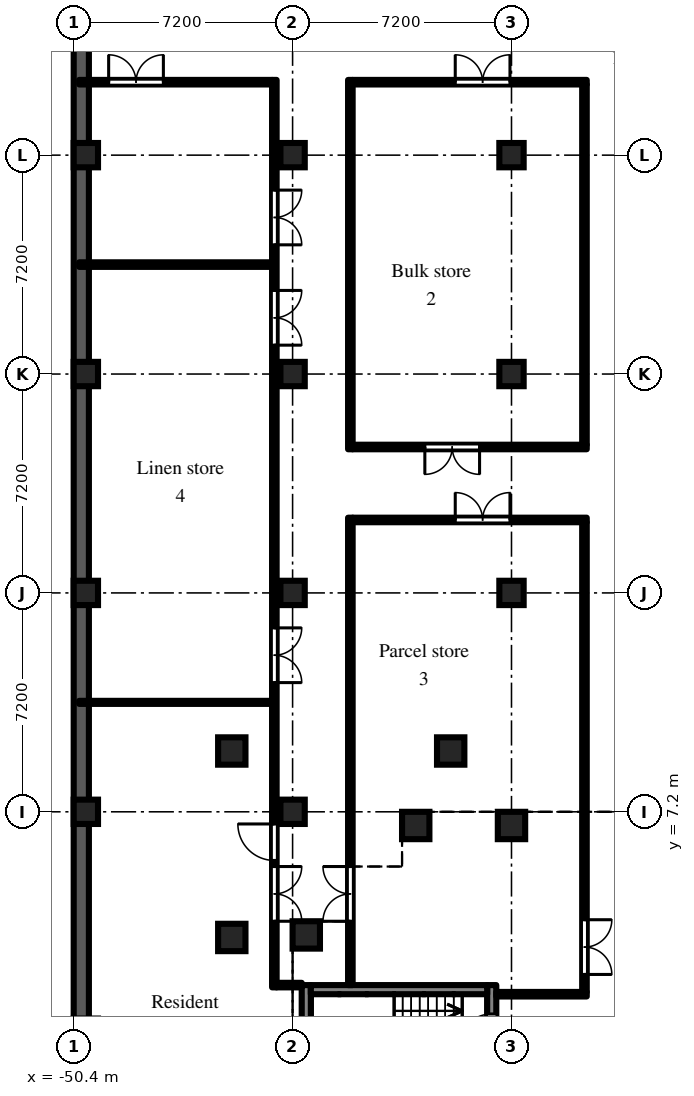
"""IFC4 building model, lengths in metres.
Left out: names, types, materials, properties, quantities, classifications, styles, units other than length and angle.
Written with IfcOpenShell. Run it as: python <this file> out.ifc"""

import sys

from ifc_helpers import new_model, si_unit, direction, frame, frame_2d, origin, origin_2d, place, context, subcontext, project, spatial, rectangle, extrude, element, fill, save


model = new_model("IFC4")
c1 = context("Model", 3, precision=1e-05, world=origin(), true_north=direction((0.0, 1.0)))
c2 = subcontext(c1, "Body", "Model", "MODEL_VIEW")
j1 = project(units=[si_unit("LENGTHUNIT", "METRE"), si_unit("PLANEANGLEUNIT", "RADIAN")], contexts=[c1])
p1 = place(None, origin())
s1 = spatial("IfcSite", under=j1, at=p1, CompositionType="ELEMENT")
p2 = place(p1, origin())
s2 = spatial("IfcBuilding", under=s1, at=p2, CompositionType="ELEMENT")
p3 = place(p2, frame((0.0, 0.0, -4.8)))
s3 = spatial("IfcBuildingStorey", under=s2, at=p3, CompositionType="ELEMENT", Elevation=-4.8)
p4 = place(p3, frame((-50.15, -49.9, -0.5), z_axis=(0.0, 0.0, 1.0), x_axis=(0.0, 1.0, 0.0)))
e1 = element("IfcWall", 1, at=p4, inside=s3, PredefinedType="SOLIDWALL", context=c2, shape_type="SweptSolid", body=[
    extrude(rectangle(XDim=99.8, YDim=0.5, at=frame_2d((49.9, 0.0))), origin(), (0.0, 0.0, 1.0), 5.3),
])
for number, where, z_axis, x_axis in (
    (2, (-42.75, 3.15, -0.5), (0.0, 0.0, 1.0), (1.0, 0.0, 0.0)),
    (3, (-39.15, 6.75, -0.5), (0.0, 0.0, 1.0), (1.0, 0.0, 0.0)),
    (4, (-36.0, 6.75, -0.5), (0.0, 0.0, 1.0), (1.0, 0.0, 0.0)),
):
    element("IfcColumn", number, at=place(p3, frame(where, z_axis=z_axis, x_axis=x_axis)), inside=s3, PredefinedType="COLUMN", context=c2, shape_type="SweptSolid", body=[
        extrude(rectangle(XDim=0.9, YDim=0.9, at=origin_2d()), origin(), (0.0, 0.0, 1.0), 5.3),
    ])
for number, where, z_axis, x_axis in (
    (5, (-50.0, 7.2, -0.5), (0.0, 0.0, 1.0), (1.0, 0.0, 0.0)),
    (6, (-50.0, 14.4, -0.5), (0.0, 0.0, 1.0), (1.0, 0.0, 0.0)),
    (7, (-50.0, 21.6, -0.5), (0.0, 0.0, 1.0), (1.0, 0.0, 0.0)),
    (8, (-50.0, 28.8, -0.5), (0.0, 0.0, 1.0), (1.0, 0.0, 0.0)),
    (9, (-43.2, 7.2, -0.5), (0.0, 0.0, 1.0), (1.0, 0.0, 0.0)),
    (10, (-43.2, 14.4, -0.5), (0.0, 0.0, 1.0), (1.0, 0.0, 0.0)),
    (11, (-43.2, 21.6, -0.5), (0.0, 0.0, 1.0), (1.0, 0.0, 0.0)),
    (12, (-43.2, 28.8, -0.5), (0.0, 0.0, 1.0), (1.0, 0.0, 0.0)),
    (13, (-36.0, 14.4, -0.5), (0.0, 0.0, 1.0), (1.0, 0.0, 0.0)),
    (14, (-36.0, 21.6, -0.5), (0.0, 0.0, 1.0), (1.0, 0.0, 0.0)),
    (15, (-36.0, 28.8, -0.5), (0.0, 0.0, 1.0), (1.0, 0.0, 0.0)),
):
    element("IfcColumn", number, at=place(p3, frame(where, z_axis=z_axis, x_axis=x_axis)), inside=s3, PredefinedType="COLUMN", context=c2, shape_type="SweptSolid", body=[
        extrude(rectangle(XDim=0.8, YDim=0.8, at=origin_2d()), origin(), (0.0, 0.0, 1.0), 5.3),
    ])
for number, where, z_axis, x_axis in (
    (16, (-45.2, 3.067, -0.5), (0.0, 0.0, 1.0), (1.0, 0.0, 0.0)),
    (17, (-45.2, 9.2, -0.5), (0.0, 0.0, 1.0), (1.0, 0.0, 0.0)),
    (18, (-38.0, 9.2, -0.5), (0.0, 0.0, 1.0), (1.0, 0.0, 0.0)),
):
    element("IfcColumn", number, at=place(p3, frame(where, z_axis=z_axis, x_axis=x_axis)), inside=s3, PredefinedType="COLUMN", context=c2, shape_type="SweptSolid", body=[
        extrude(rectangle(XDim=0.9, YDim=0.9, at=origin_2d()), origin(), (0.0, 0.0, 1.0), 5.3),
    ])
p5 = place(p3, frame((-36.65, -1.5, 0.0), z_axis=(0.0, 0.0, 1.0), x_axis=(0.0, 1.0, 0.0)))
e19 = element("IfcWall", 19, at=p5, inside=s3, PredefinedType="SHEAR", context=c2, shape_type="SweptSolid", body=[
    extrude(rectangle(XDim=3.0, YDim=0.3, at=frame_2d((1.5, 0.0))), origin(), (0.0, 0.0, 1.0), 4.35),
])
p6 = place(p5, frame((0.95, 0.0, 0.0)))
e20 = element("IfcOpeningElement", 20, at=p6, cuts=e19, PredefinedType="OPENING", context=c2, shape_type="SweptSolid", body=[
    extrude(rectangle(XDim=1.1, YDim=2.1, at=frame_2d((0.55, 1.05))), frame((0.0, 0.16, 0.0), z_axis=(0.0, -1.0, 0.0), x_axis=(1.0, 0.0, 0.0)), (0.0, 0.0, 1.0), 0.32),
])
p7 = place(p3, frame((-42.75, -1.5, 0.0), z_axis=(0.0, 0.0, 1.0), x_axis=(0.0, 1.0, 0.0)))
e21 = element("IfcWall", 21, at=p7, inside=s3, PredefinedType="SHEAR", context=c2, shape_type="SweptSolid", body=[
    extrude(rectangle(XDim=3.0, YDim=0.3, at=frame_2d((1.5, 0.0))), origin(), (0.0, 0.0, 1.0), 4.35),
])
p8 = place(p3, frame((-36.8, 1.35, 0.0), z_axis=(0.0, 0.0, 1.0), x_axis=(-1.0, 0.0, 0.0)))
e22 = element("IfcWall", 22, at=p8, inside=s3, PredefinedType="SHEAR", context=c2, shape_type="SweptSolid", body=[
    extrude(rectangle(XDim=5.8, YDim=0.3, at=frame_2d((2.9, 0.0))), origin(), (0.0, 0.0, 1.0), 4.35),
])
p9 = place(p3, frame((-50.22, 10.8, 0.0), z_axis=(0.0, 0.0, 1.0), x_axis=(1.0, 0.0, 0.0)))
e23 = element("IfcWall", 23, at=p9, inside=s3, PredefinedType="PARTITIONING", context=c2, shape_type="SweptSolid", body=[
    extrude(rectangle(XDim=6.345, YDim=0.1, at=frame_2d((3.172, 0.0))), origin(), (0.0, 0.0, 1.0), 4.35),
])
p10 = place(p3, frame((-50.22, 25.2, 0.0), z_axis=(0.0, 0.0, 1.0), x_axis=(1.0, 0.0, 0.0)))
e24 = element("IfcWall", 24, at=p10, inside=s3, PredefinedType="PARTITIONING", context=c2, shape_type="SweptSolid", body=[
    extrude(rectangle(XDim=6.345, YDim=0.15, at=frame_2d((3.172, 0.0))), origin(), (0.0, 0.0, 1.0), 4.35),
])
p11 = place(p3, frame((-50.22, 31.2, 0.0), z_axis=(0.0, 0.0, 1.0), x_axis=(1.0, 0.0, 0.0)))
e25 = element("IfcWall", 25, at=p11, inside=s3, PredefinedType="PARTITIONING", context=c2, shape_type="SweptSolid", body=[
    extrude(rectangle(XDim=6.345, YDim=0.15, at=frame_2d((3.172, 0.0))), origin(), (0.0, 0.0, 1.0), 4.35),
])
p12 = place(p11, frame((0.97, 0.0, 0.0)))
e26 = element("IfcOpeningElement", 26, at=p12, cuts=e25, PredefinedType="OPENING", context=c2, shape_type="SweptSolid", body=[
    extrude(rectangle(XDim=1.8, YDim=2.1, at=frame_2d((0.9, 1.05))), frame((0.0, 0.085, 0.0), z_axis=(0.0, -1.0, 0.0), x_axis=(1.0, 0.0, 0.0)), (0.0, 0.0, 1.0), 0.17),
])
p13 = place(p3, frame((-43.8, 1.425, 0.0), z_axis=(0.0, 0.0, 1.0), x_axis=(0.0, 1.0, 0.0)))
e27 = element("IfcWall", 27, at=p13, inside=s3, PredefinedType="PARTITIONING", context=c2, shape_type="SweptSolid", body=[
    extrude(rectangle(XDim=29.85, YDim=0.15, at=frame_2d((14.925, 0.0))), origin(), (0.0, 0.0, 1.0), 4.35),
])
p14 = place(p13, frame((24.425, 0.0, 0.0)))
e28 = element("IfcOpeningElement", 28, at=p14, cuts=e27, PredefinedType="OPENING", context=c2, shape_type="SweptSolid", body=[
    extrude(rectangle(XDim=1.8, YDim=2.1, at=frame_2d((0.9, 1.05))), frame((0.0, 0.085, 0.0), z_axis=(0.0, -1.0, 0.0), x_axis=(1.0, 0.0, 0.0)), (0.0, 0.0, 1.0), 0.17),
])
p15 = place(p13, frame((10.025, 0.0, 0.0)))
e29 = element("IfcOpeningElement", 29, at=p15, cuts=e27, PredefinedType="OPENING", context=c2, shape_type="SweptSolid", body=[
    extrude(rectangle(XDim=1.8, YDim=2.1, at=frame_2d((0.9, 1.05))), frame((0.0, 0.085, 0.0), z_axis=(0.0, -1.0, 0.0), x_axis=(1.0, 0.0, 0.0)), (0.0, 0.0, 1.0), 0.17),
])
p16 = place(p13, frame((21.125, 0.0, 0.0)))
e30 = element("IfcOpeningElement", 30, at=p16, cuts=e27, PredefinedType="OPENING", context=c2, shape_type="SweptSolid", body=[
    extrude(rectangle(XDim=1.8, YDim=2.1, at=frame_2d((0.9, 1.05))), frame((0.0, 0.085, 0.0), z_axis=(0.0, -1.0, 0.0), x_axis=(1.0, 0.0, 0.0)), (0.0, 0.0, 1.0), 0.17),
])
p17 = place(p13, frame((2.175, 0.0, 0.0)))
e31 = element("IfcOpeningElement", 31, at=p17, cuts=e27, PredefinedType="OPENING", context=c2, shape_type="SweptSolid", body=[
    extrude(rectangle(XDim=1.8, YDim=2.1, at=frame_2d((0.9, 1.05))), frame((0.0, 0.085, 0.0), z_axis=(0.0, -1.0, 0.0), x_axis=(1.0, 0.0, 0.0)), (0.0, 0.0, 1.0), 0.17),
])
p18 = place(p13, frame((4.175, 0.0, 0.0)))
e32 = element("IfcOpeningElement", 32, at=p18, cuts=e27, PredefinedType="OPENING", context=c2, shape_type="SweptSolid", body=[
    extrude(rectangle(XDim=1.2, YDim=2.1, at=frame_2d((0.6, 1.05))), frame((0.0, 0.085, 0.0), z_axis=(0.0, -1.0, 0.0), x_axis=(1.0, 0.0, 0.0)), (0.0, 0.0, 1.0), 0.17),
])
p19 = place(p3, frame((-43.725, 1.5, 0.0), z_axis=(0.0, 0.0, 1.0), x_axis=(1.0, 0.0, 0.0)))
e33 = element("IfcWall", 33, at=p19, inside=s3, PredefinedType="PARTITIONING", context=c2, shape_type="SweptSolid", body=[
    extrude(rectangle(XDim=0.825, YDim=0.15, at=frame_2d((0.413, 0.0))), origin(), (0.0, 0.0, 1.0), 4.35),
])
p20 = place(p3, frame((-41.3, 1.5, 0.0), z_axis=(0.0, 0.0, 1.0), x_axis=(0.0, 1.0, 0.0)))
e34 = element("IfcWall", 34, at=p20, inside=s3, PredefinedType="PARTITIONING", context=c2, shape_type="SweptSolid", body=[
    extrude(rectangle(XDim=15.375, YDim=0.15, at=frame_2d((7.688, 0.0))), origin(), (0.0, 0.0, 1.0), 4.35),
])
p21 = place(p20, frame((2.1, 0.0, 0.0)))
e35 = element("IfcOpeningElement", 35, at=p21, cuts=e34, PredefinedType="OPENING", context=c2, shape_type="SweptSolid", body=[
    extrude(rectangle(XDim=1.8, YDim=2.1, at=frame_2d((0.9, 1.05))), frame((0.0, 0.085, 0.0), z_axis=(0.0, -1.0, 0.0), x_axis=(1.0, 0.0, 0.0)), (0.0, 0.0, 1.0), 0.17),
])
p22 = place(p3, frame((-41.225, 16.8, 0.0), z_axis=(0.0, 0.0, 1.0), x_axis=(1.0, 0.0, 0.0)))
e36 = element("IfcWall", 36, at=p22, inside=s3, PredefinedType="PARTITIONING", context=c2, shape_type="SweptSolid", body=[
    extrude(rectangle(XDim=7.7, YDim=0.15, at=frame_2d((3.85, 0.0))), origin(), (0.0, 0.0, 1.0), 4.35),
])
p23 = place(p22, frame((3.375, 0.0, 0.0)))
e37 = element("IfcOpeningElement", 37, at=p23, cuts=e36, PredefinedType="OPENING", context=c2, shape_type="SweptSolid", body=[
    extrude(rectangle(XDim=1.8, YDim=2.1, at=frame_2d((0.9, 1.05))), frame((0.0, 0.085, 0.0), z_axis=(0.0, -1.0, 0.0), x_axis=(1.0, 0.0, 0.0)), (0.0, 0.0, 1.0), 0.17),
])
p24 = place(p3, frame((-41.3, 19.125, 0.0), z_axis=(0.0, 0.0, 1.0), x_axis=(0.0, 1.0, 0.0)))
e38 = element("IfcWall", 38, at=p24, inside=s3, PredefinedType="PARTITIONING", context=c2, shape_type="SweptSolid", body=[
    extrude(rectangle(XDim=12.15, YDim=0.15, at=frame_2d((6.075, 0.0))), origin(), (0.0, 0.0, 1.0), 4.35),
])
p25 = place(p3, frame((-41.225, 19.2, 0.0), z_axis=(0.0, 0.0, 1.0), x_axis=(1.0, 0.0, 0.0)))
e39 = element("IfcWall", 39, at=p25, inside=s3, PredefinedType="PARTITIONING", context=c2, shape_type="SweptSolid", body=[
    extrude(rectangle(XDim=7.7, YDim=0.15, at=frame_2d((3.85, 0.0))), origin(), (0.0, 0.0, 1.0), 4.35),
])
p26 = place(p25, frame((2.375, 0.0, 0.0)))
e40 = element("IfcOpeningElement", 40, at=p26, cuts=e39, PredefinedType="OPENING", context=c2, shape_type="SweptSolid", body=[
    extrude(rectangle(XDim=1.8, YDim=2.1, at=frame_2d((0.9, 1.05))), frame((0.0, 0.085, 0.0), z_axis=(0.0, -1.0, 0.0), x_axis=(1.0, 0.0, 0.0)), (0.0, 0.0, 1.0), 0.17),
])
p27 = place(p3, frame((-41.225, 31.2, 0.0), z_axis=(0.0, 0.0, 1.0), x_axis=(1.0, 0.0, 0.0)))
e41 = element("IfcWall", 41, at=p27, inside=s3, PredefinedType="PARTITIONING", context=c2, shape_type="SweptSolid", body=[
    extrude(rectangle(XDim=7.7, YDim=0.15, at=frame_2d((3.85, 0.0))), origin(), (0.0, 0.0, 1.0), 4.35),
])
p28 = place(p27, frame((3.375, 0.0, 0.0)))
e42 = element("IfcOpeningElement", 42, at=p28, cuts=e41, PredefinedType="OPENING", context=c2, shape_type="SweptSolid", body=[
    extrude(rectangle(XDim=1.8, YDim=2.1, at=frame_2d((0.9, 1.05))), frame((0.0, 0.085, 0.0), z_axis=(0.0, -1.0, 0.0), x_axis=(1.0, 0.0, 0.0)), (0.0, 0.0, 1.0), 0.17),
])
p29 = place(p3, frame((-36.5, 1.2, 0.0), z_axis=(0.0, 0.0, 1.0), x_axis=(1.0, 0.0, 0.0)))
e43 = element("IfcWall", 43, at=p29, inside=s3, PredefinedType="PARTITIONING", context=c2, shape_type="SweptSolid", body=[
    extrude(rectangle(XDim=2.975, YDim=0.15, at=frame_2d((1.488, 0.0))), origin(), (0.0, 0.0, 1.0), 4.35),
])
p30 = place(p3, frame((-33.6, 1.275, 0.0), z_axis=(0.0, 0.0, 1.0), x_axis=(0.0, 1.0, 0.0)))
e44 = element("IfcWall", 44, at=p30, inside=s3, PredefinedType="PARTITIONING", context=c2, shape_type="SweptSolid", body=[
    extrude(rectangle(XDim=15.45, YDim=0.15, at=frame_2d((7.725, 0.0))), origin(), (0.0, 0.0, 1.0), 4.35),
])
p31 = place(p30, frame((0.575, 0.0, 0.0)))
e45 = element("IfcOpeningElement", 45, at=p31, cuts=e44, PredefinedType="OPENING", context=c2, shape_type="SweptSolid", body=[
    extrude(rectangle(XDim=1.8, YDim=2.1, at=frame_2d((0.9, 1.05))), frame((0.0, 0.085, 0.0), z_axis=(0.0, -1.0, 0.0), x_axis=(1.0, 0.0, 0.0)), (0.0, 0.0, 1.0), 0.17),
])
p32 = place(p3, frame((-33.6, 19.275, 0.0), z_axis=(0.0, 0.0, 1.0), x_axis=(0.0, 1.0, 0.0)))
e46 = element("IfcWall", 46, at=p32, inside=s3, PredefinedType="PARTITIONING", context=c2, shape_type="SweptSolid", body=[
    extrude(rectangle(XDim=11.85, YDim=0.15, at=frame_2d((5.925, 0.0))), origin(), (0.0, 0.0, 1.0), 4.35),
])
p33 = place(p6, origin())
e47 = element("IfcDoor", 47, at=p33, inside=s3, OperationType="SINGLE_SWING_LEFT", PredefinedType="DOOR", context=c2, shape_type="SweptSolid", body=[
    extrude(rectangle(XDim=1.1, YDim=2.1, at=frame_2d((0.55, 1.05))), frame((0.0, 0.025, 0.0), z_axis=(0.0, -1.0, 0.0), x_axis=(1.0, 0.0, 0.0)), (0.0, 0.0, 1.0), 0.05),
])
fill(e20, e47)
p34 = place(p12, origin())
e48 = element("IfcDoor", 48, at=p34, inside=s3, OperationType="DOUBLE_DOOR_DOUBLE_SWING", PredefinedType="DOOR", context=c2, shape_type="SweptSolid", body=[
    extrude(rectangle(XDim=1.8, YDim=2.1, at=frame_2d((0.9, 1.05))), frame((0.0, 0.025, 0.0), z_axis=(0.0, -1.0, 0.0), x_axis=(1.0, 0.0, 0.0)), (0.0, 0.0, 1.0), 0.05),
])
fill(e26, e48)
p35 = place(p14, frame((1.8, 0.0, 0.0), z_axis=(0.0, 0.0, 1.0), x_axis=(-1.0, 0.0, 0.0)))
e49 = element("IfcDoor", 49, at=p35, inside=s3, OperationType="DOUBLE_DOOR_DOUBLE_SWING", PredefinedType="DOOR", context=c2, shape_type="SweptSolid", body=[
    extrude(rectangle(XDim=1.8, YDim=2.1, at=frame_2d((0.9, 1.05))), frame((0.0, 0.025, 0.0), z_axis=(0.0, -1.0, 0.0), x_axis=(1.0, 0.0, 0.0)), (0.0, 0.0, 1.0), 0.05),
])
fill(e28, e49)
p36 = place(p26, frame((1.8, 0.0, 0.0), z_axis=(0.0, 0.0, 1.0), x_axis=(-1.0, 0.0, 0.0)))
e50 = element("IfcDoor", 50, at=p36, inside=s3, OperationType="DOUBLE_DOOR_DOUBLE_SWING", PredefinedType="DOOR", context=c2, shape_type="SweptSolid", body=[
    extrude(rectangle(XDim=1.8, YDim=2.1, at=frame_2d((0.9, 1.05))), frame((0.0, 0.025, 0.0), z_axis=(0.0, -1.0, 0.0), x_axis=(1.0, 0.0, 0.0)), (0.0, 0.0, 1.0), 0.05),
])
fill(e40, e50)
p37 = place(p28, origin())
e51 = element("IfcDoor", 51, at=p37, inside=s3, OperationType="DOUBLE_DOOR_DOUBLE_SWING", PredefinedType="DOOR", context=c2, shape_type="SweptSolid", body=[
    extrude(rectangle(XDim=1.8, YDim=2.1, at=frame_2d((0.9, 1.05))), frame((0.0, 0.025, 0.0), z_axis=(0.0, -1.0, 0.0), x_axis=(1.0, 0.0, 0.0)), (0.0, 0.0, 1.0), 0.05),
])
fill(e42, e51)
p38 = place(p15, frame((1.8, 0.0, 0.0), z_axis=(0.0, 0.0, 1.0), x_axis=(-1.0, 0.0, 0.0)))
e52 = element("IfcDoor", 52, at=p38, inside=s3, OperationType="DOUBLE_DOOR_DOUBLE_SWING", PredefinedType="DOOR", context=c2, shape_type="SweptSolid", body=[
    extrude(rectangle(XDim=1.8, YDim=2.1, at=frame_2d((0.9, 1.05))), frame((0.0, 0.025, 0.0), z_axis=(0.0, -1.0, 0.0), x_axis=(1.0, 0.0, 0.0)), (0.0, 0.0, 1.0), 0.05),
])
fill(e29, e52)
p39 = place(p16, frame((1.8, 0.0, 0.0), z_axis=(0.0, 0.0, 1.0), x_axis=(-1.0, 0.0, 0.0)))
e53 = element("IfcDoor", 53, at=p39, inside=s3, OperationType="DOUBLE_DOOR_DOUBLE_SWING", PredefinedType="DOOR", context=c2, shape_type="SweptSolid", body=[
    extrude(rectangle(XDim=1.8, YDim=2.1, at=frame_2d((0.9, 1.05))), frame((0.0, 0.025, 0.0), z_axis=(0.0, -1.0, 0.0), x_axis=(1.0, 0.0, 0.0)), (0.0, 0.0, 1.0), 0.05),
])
fill(e30, e53)
p40 = place(p21, origin())
e54 = element("IfcDoor", 54, at=p40, inside=s3, OperationType="DOUBLE_DOOR_DOUBLE_SWING", PredefinedType="DOOR", context=c2, shape_type="SweptSolid", body=[
    extrude(rectangle(XDim=1.8, YDim=2.1, at=frame_2d((0.9, 1.05))), frame((0.0, 0.025, 0.0), z_axis=(0.0, -1.0, 0.0), x_axis=(1.0, 0.0, 0.0)), (0.0, 0.0, 1.0), 0.05),
])
fill(e35, e54)
p41 = place(p23, origin())
e55 = element("IfcDoor", 55, at=p41, inside=s3, OperationType="DOUBLE_DOOR_DOUBLE_SWING", PredefinedType="DOOR", context=c2, shape_type="SweptSolid", body=[
    extrude(rectangle(XDim=1.8, YDim=2.1, at=frame_2d((0.9, 1.05))), frame((0.0, 0.025, 0.0), z_axis=(0.0, -1.0, 0.0), x_axis=(1.0, 0.0, 0.0)), (0.0, 0.0, 1.0), 0.05),
])
fill(e37, e55)
p42 = place(p31, frame((1.8, 0.0, 0.0), z_axis=(0.0, 0.0, 1.0), x_axis=(-1.0, 0.0, 0.0)))
e56 = element("IfcDoor", 56, at=p42, inside=s3, OperationType="DOUBLE_DOOR_DOUBLE_SWING", PredefinedType="DOOR", context=c2, shape_type="SweptSolid", body=[
    extrude(rectangle(XDim=1.8, YDim=2.1, at=frame_2d((0.9, 1.05))), frame((0.0, 0.025, 0.0), z_axis=(0.0, -1.0, 0.0), x_axis=(1.0, 0.0, 0.0)), (0.0, 0.0, 1.0), 0.05),
])
fill(e45, e56)
p43 = place(p17, frame((1.8, 0.0, 0.0), z_axis=(0.0, 0.0, 1.0), x_axis=(-1.0, 0.0, 0.0)))
e57 = element("IfcDoor", 57, at=p43, inside=s3, OperationType="DOUBLE_DOOR_DOUBLE_SWING", PredefinedType="DOOR", context=c2, shape_type="SweptSolid", body=[
    extrude(rectangle(XDim=1.8, YDim=2.1, at=frame_2d((0.9, 1.05))), frame((0.0, 0.025, 0.0), z_axis=(0.0, -1.0, 0.0), x_axis=(1.0, 0.0, 0.0)), (0.0, 0.0, 1.0), 0.05),
])
fill(e31, e57)
p44 = place(p18, origin())
e58 = element("IfcDoor", 58, at=p44, inside=s3, OperationType="SINGLE_SWING_RIGHT", PredefinedType="DOOR", context=c2, shape_type="SweptSolid", body=[
    extrude(rectangle(XDim=1.2, YDim=2.1, at=frame_2d((0.6, 1.05))), frame((0.0, 0.025, 0.0), z_axis=(0.0, -1.0, 0.0), x_axis=(1.0, 0.0, 0.0)), (0.0, 0.0, 1.0), 0.05),
])
fill(e32, e58)
save(model, sys.argv[1])
